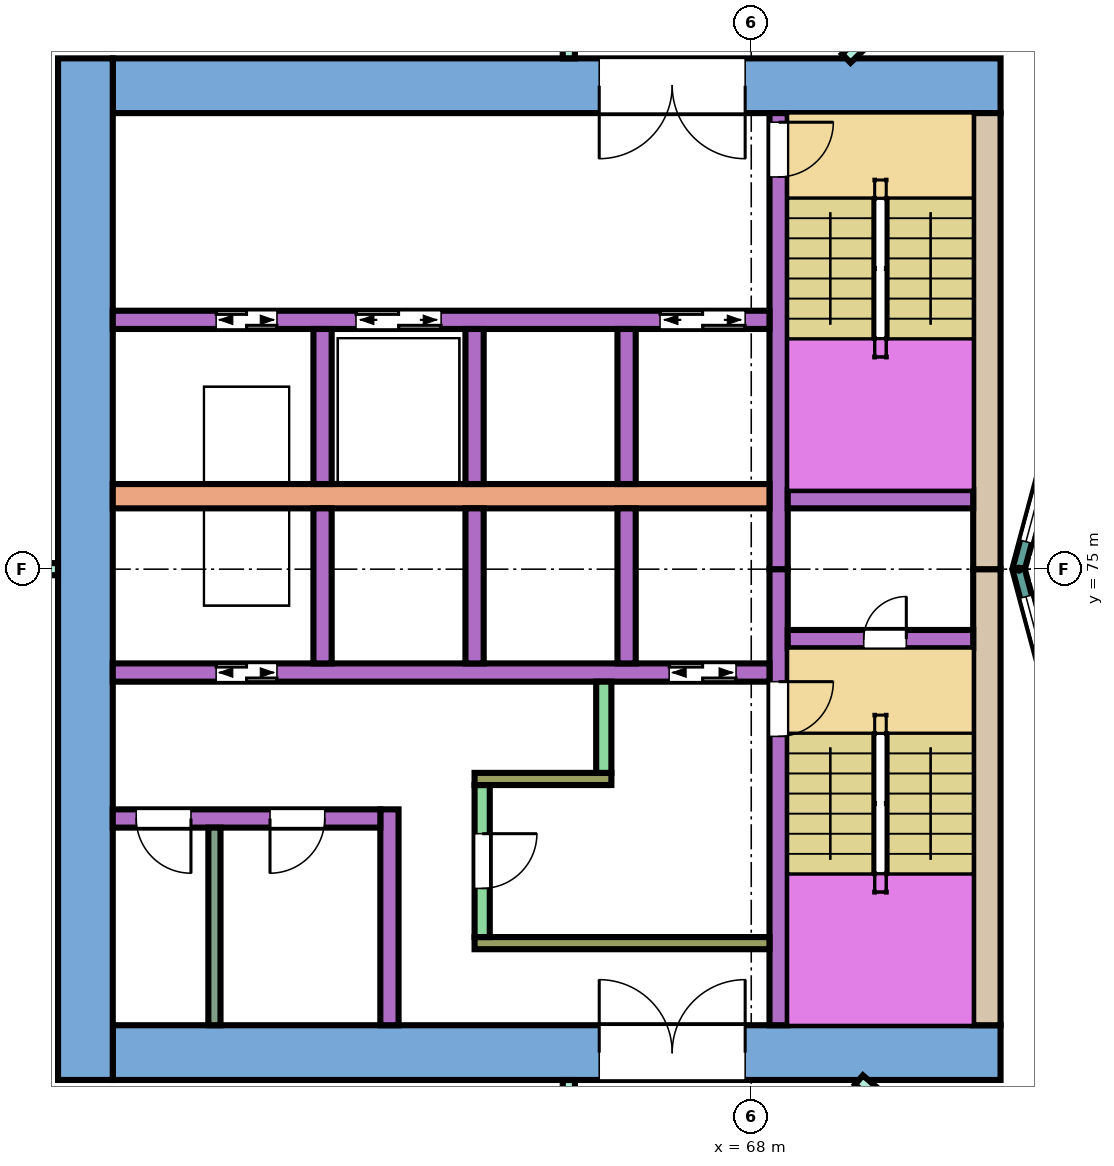
"""IFC4 building model, lengths in metres.
Left out: names, types, materials, properties, quantities, classifications, styles, units other than length and angle.
Written with IfcOpenShell. Run it as: python <this file> out.ifc"""

import sys

from ifc_helpers import new_model, si_unit, direction, frame, frame_2d, origin, place, context, subcontext, project, spatial, rectangle, extrude, element, fill, save


model = new_model("IFC4")
c1 = context("Model", 3, precision=1e-05, world=origin(), true_north=direction((0.0, 1.0)))
c2 = subcontext(c1, "Body", "Model", "MODEL_VIEW")
j1 = project(units=[si_unit("LENGTHUNIT", "METRE"), si_unit("PLANEANGLEUNIT", "RADIAN")], contexts=[c1])
p1 = place(None, origin())
s1 = spatial("IfcSite", under=j1, at=p1, CompositionType="ELEMENT")
p2 = place(p1, origin())
s2 = spatial("IfcBuilding", under=s1, at=p2, CompositionType="ELEMENT")
p3 = place(p2, frame((0.0, 0.0, 23.8)))
s3 = spatial("IfcBuildingStorey", under=s2, at=p3, CompositionType="ELEMENT", Elevation=23.8)
p4 = place(p3, frame((72.1, 67.05, 0.0), z_axis=(0.0, 0.0, 1.0), x_axis=(-1.0, 0.0, 0.0)))
e1 = element("IfcWall", 1, at=p4, inside=s3, PredefinedType="SHEAR", context=c2, shape_type="SweptSolid", body=[
    extrude(rectangle(XDim=14.6, YDim=0.9, at=frame_2d((7.3, 0.0))), origin(), (0.0, 0.0, 1.0), 4.68),
])
p5 = place(p4, frame((4.2, 0.0, 0.0)))
e2 = element("IfcOpeningElement", 2, at=p5, cuts=e1, PredefinedType="OPENING", context=c2, shape_type="SweptSolid", body=[
    extrude(rectangle(XDim=2.4, YDim=2.4, at=frame_2d((1.2, 1.2))), frame((0.0, 0.46, 0.0), z_axis=(0.0, -1.0, 0.0), x_axis=(1.0, 0.0, 0.0)), (0.0, 0.0, 1.0), 0.92),
])
p6 = place(p3, frame((72.1, 82.95, 0.0), z_axis=(0.0, 0.0, 1.0), x_axis=(-1.0, 0.0, 0.0)))
e3 = element("IfcWall", 3, at=p6, inside=s3, PredefinedType="SHEAR", context=c2, shape_type="SweptSolid", body=[
    extrude(rectangle(XDim=14.6, YDim=0.9, at=frame_2d((7.3, 0.0))), origin(), (0.0, 0.0, 1.0), 4.68),
])
p7 = place(p6, frame((4.2, 0.0, 0.0)))
e4 = element("IfcOpeningElement", 4, at=p7, cuts=e3, PredefinedType="OPENING", context=c2, shape_type="SweptSolid", body=[
    extrude(rectangle(XDim=2.4, YDim=2.4, at=frame_2d((1.2, 1.2))), frame((0.0, 0.46, 0.0), z_axis=(0.0, -1.0, 0.0), x_axis=(1.0, 0.0, 0.0)), (0.0, 0.0, 1.0), 0.92),
])
for number, where, z_axis, x_axis in (
    (5, (71.875, 75.0, 0.0), (0.0, 0.0, 1.0), (0.0, -1.0, 0.0)),
    (6, (71.875, 82.5, 0.0), (0.0, 0.0, 1.0), (0.0, -1.0, 0.0)),
):
    element("IfcWall", number, at=place(p3, frame(where, z_axis=z_axis, x_axis=x_axis)), inside=s3, PredefinedType="SHEAR", context=c2, shape_type="SweptSolid", body=[
        extrude(rectangle(XDim=7.5, YDim=0.45, at=frame_2d((3.75, 0.0))), origin(), (0.0, 0.0, 1.0), 4.68),
    ])
p8 = place(p3, frame((57.05, 83.4, 0.0), z_axis=(0.0, 0.0, 1.0), x_axis=(0.0, -1.0, 0.0)))
e7 = element("IfcWall", 7, at=p8, inside=s3, PredefinedType="SHEAR", context=c2, shape_type="SweptSolid", body=[
    extrude(rectangle(XDim=16.8, YDim=0.9, at=frame_2d((8.4, 0.0))), origin(), (0.0, 0.0, 1.0), 4.68),
])
p9 = place(p3, frame((68.45, 75.0, 0.0), z_axis=(0.0, 0.0, 1.0), x_axis=(0.0, -1.0, 0.0)))
e8 = element("IfcWall", 8, at=p9, inside=s3, PredefinedType="SHEAR", context=c2, shape_type="SweptSolid", body=[
    extrude(rectangle(XDim=7.5, YDim=0.3, at=frame_2d((3.75, 0.0))), origin(), (0.0, 0.0, 1.0), 4.68),
])
p10 = place(p9, frame((1.85, 0.0, 0.0)))
e9 = element("IfcOpeningElement", 9, at=p10, cuts=e8, PredefinedType="OPENING", context=c2, shape_type="SweptSolid", body=[
    extrude(rectangle(XDim=0.9, YDim=2.1, at=frame_2d((0.45, 1.05))), frame((0.0, 0.16, 0.0), z_axis=(0.0, -1.0, 0.0), x_axis=(1.0, 0.0, 0.0)), (0.0, 0.0, 1.0), 0.32),
])
p11 = place(p3, frame((68.45, 82.5, 0.0), z_axis=(0.0, 0.0, 1.0), x_axis=(0.0, -1.0, 0.0)))
e10 = element("IfcWall", 10, at=p11, inside=s3, PredefinedType="SHEAR", context=c2, shape_type="SweptSolid", body=[
    extrude(rectangle(XDim=7.5, YDim=0.3, at=frame_2d((3.75, 0.0))), origin(), (0.0, 0.0, 1.0), 4.68),
])
p12 = place(p11, frame((0.15, 0.0, 0.0)))
e11 = element("IfcOpeningElement", 11, at=p12, cuts=e10, PredefinedType="OPENING", context=c2, shape_type="SweptSolid", body=[
    extrude(rectangle(XDim=0.9, YDim=2.1, at=frame_2d((0.45, 1.05))), frame((0.0, 0.16, 0.0), z_axis=(0.0, -1.0, 0.0), x_axis=(1.0, 0.0, 0.0)), (0.0, 0.0, 1.0), 0.32),
])
p13 = place(p3, frame((71.65, 73.85, 0.0), z_axis=(0.0, 0.0, 1.0), x_axis=(-1.0, 0.0, 0.0)))
e12 = element("IfcWall", 12, at=p13, inside=s3, PredefinedType="SHEAR", context=c2, shape_type="SweptSolid", body=[
    extrude(rectangle(XDim=3.05, YDim=0.3, at=frame_2d((1.525, 0.0))), origin(), (0.0, 0.0, 1.0), 4.68),
])
p14 = place(p13, frame((1.1, 0.0, 0.0)))
e13 = element("IfcOpeningElement", 13, at=p14, cuts=e12, PredefinedType="OPENING", context=c2, shape_type="SweptSolid", body=[
    extrude(rectangle(XDim=0.7, YDim=2.0, at=frame_2d((0.35, 1.0))), frame((0.0, 0.16, 0.0), z_axis=(0.0, -1.0, 0.0), x_axis=(1.0, 0.0, 0.0)), (0.0, 0.0, 1.0), 0.32),
])
p15 = place(p3, frame((71.65, 76.15, 0.0), z_axis=(0.0, 0.0, 1.0), x_axis=(-1.0, 0.0, 0.0)))
e14 = element("IfcWall", 14, at=p15, inside=s3, PredefinedType="SHEAR", context=c2, shape_type="SweptSolid", body=[
    extrude(rectangle(XDim=3.05, YDim=0.3, at=frame_2d((1.525, 0.0))), origin(), (0.0, 0.0, 1.0), 4.68),
])
p16 = place(p3, frame((68.3, 73.3, 0.0), z_axis=(0.0, 0.0, 1.0), x_axis=(-1.0, 0.0, 0.0)))
e15 = element("IfcWall", 15, at=p16, inside=s3, PredefinedType="SHEAR", context=c2, shape_type="SweptSolid", body=[
    extrude(rectangle(XDim=10.8, YDim=0.3, at=frame_2d((5.4, 0.0))), origin(), (0.0, 0.0, 1.0), 4.68),
])
p17 = place(p16, frame((0.55, 0.0, 0.0)))
e16 = element("IfcOpeningElement", 16, at=p17, cuts=e15, PredefinedType="OPENING", context=c2, shape_type="SweptSolid", body=[
    extrude(rectangle(XDim=1.1, YDim=2.1, at=frame_2d((0.55, 1.05))), frame((0.0, 0.16, 0.0), z_axis=(0.0, -1.0, 0.0), x_axis=(1.0, 0.0, 0.0)), (0.0, 0.0, 1.0), 0.32),
])
p18 = place(p16, frame((8.1, 0.0, 0.0)))
e17 = element("IfcOpeningElement", 17, at=p18, cuts=e15, PredefinedType="OPENING", context=c2, shape_type="SweptSolid", body=[
    extrude(rectangle(XDim=1.0, YDim=2.1, at=frame_2d((0.5, 1.05))), frame((0.0, 0.16, 0.0), z_axis=(0.0, -1.0, 0.0), x_axis=(1.0, 0.0, 0.0)), (0.0, 0.0, 1.0), 0.32),
])
p19 = place(p3, frame((68.3, 76.2, 0.0), z_axis=(0.0, 0.0, 1.0), x_axis=(-1.0, 0.0, 0.0)))
e18 = element("IfcWall", 18, at=p19, inside=s3, PredefinedType="SHEAR", context=c2, shape_type="SweptSolid", body=[
    extrude(rectangle(XDim=10.8, YDim=0.4, at=frame_2d((5.4, 0.0))), origin(), (0.0, 0.0, 1.0), 4.68),
])
p20 = place(p3, frame((68.3, 79.1, 0.0), z_axis=(0.0, 0.0, 1.0), x_axis=(-1.0, 0.0, 0.0)))
e19 = element("IfcWall", 19, at=p20, inside=s3, PredefinedType="SHEAR", context=c2, shape_type="SweptSolid", body=[
    extrude(rectangle(XDim=10.8, YDim=0.3, at=frame_2d((5.4, 0.0))), origin(), (0.0, 0.0, 1.0), 4.68),
])
p21 = place(p20, frame((0.4, 0.0, 0.0)))
e20 = element("IfcOpeningElement", 20, at=p21, cuts=e19, PredefinedType="OPENING", context=c2, shape_type="SweptSolid", body=[
    extrude(rectangle(XDim=1.4, YDim=2.1, at=frame_2d((0.7, 1.05))), frame((0.0, 0.16, 0.0), z_axis=(0.0, -1.0, 0.0), x_axis=(1.0, 0.0, 0.0)), (0.0, 0.0, 1.0), 0.32),
])
p22 = place(p20, frame((5.4, 0.0, 0.0)))
e21 = element("IfcOpeningElement", 21, at=p22, cuts=e19, PredefinedType="OPENING", context=c2, shape_type="SweptSolid", body=[
    extrude(rectangle(XDim=1.4, YDim=2.1, at=frame_2d((0.7, 1.05))), frame((0.0, 0.16, 0.0), z_axis=(0.0, -1.0, 0.0), x_axis=(1.0, 0.0, 0.0)), (0.0, 0.0, 1.0), 0.32),
])
p23 = place(p20, frame((8.1, 0.0, 0.0)))
e22 = element("IfcOpeningElement", 22, at=p23, cuts=e19, PredefinedType="OPENING", context=c2, shape_type="SweptSolid", body=[
    extrude(rectangle(XDim=1.0, YDim=2.1, at=frame_2d((0.5, 1.05))), frame((0.0, 0.16, 0.0), z_axis=(0.0, -1.0, 0.0), x_axis=(1.0, 0.0, 0.0)), (0.0, 0.0, 1.0), 0.32),
])
for number, where, z_axis, x_axis in (
    (23, (65.95, 76.0, 0.0), (0.0, 0.0, 1.0), (0.0, -1.0, 0.0)),
    (24, (63.45, 76.0, 0.0), (0.0, 0.0, 1.0), (0.0, -1.0, 0.0)),
    (25, (60.95, 76.0, 0.0), (0.0, 0.0, 1.0), (0.0, -1.0, 0.0)),
    (26, (65.95, 78.95, 0.0), (0.0, 0.0, 1.0), (0.0, -1.0, 0.0)),
    (27, (63.45, 78.95, 0.0), (0.0, 0.0, 1.0), (0.0, -1.0, 0.0)),
    (28, (60.95, 78.95, 0.0), (0.0, 0.0, 1.0), (0.0, -1.0, 0.0)),
):
    element("IfcWall", number, at=place(p3, frame(where, z_axis=z_axis, x_axis=x_axis)), inside=s3, PredefinedType="SHEAR", context=c2, shape_type="SweptSolid", body=[
        extrude(rectangle(XDim=2.55, YDim=0.3, at=frame_2d((1.275, 0.0))), origin(), (0.0, 0.0, 1.0), 4.68),
    ])
p24 = place(p3, frame((68.3, 68.85, 0.0), z_axis=(0.0, 0.0, 1.0), x_axis=(-1.0, 0.0, 0.0)))
e29 = element("IfcWall", 29, at=p24, inside=s3, PredefinedType="SHEAR", context=c2, shape_type="SweptSolid", body=[
    extrude(rectangle(XDim=4.85, YDim=0.2, at=frame_2d((2.425, 0.0))), origin(), (0.0, 0.0, 1.0), 4.68),
])
p25 = place(p3, frame((63.575, 71.45, 0.0), z_axis=(0.0, 0.0, 1.0), x_axis=(0.0, -1.0, 0.0)))
e30 = element("IfcWall", 30, at=p25, inside=s3, PredefinedType="SHEAR", context=c2, shape_type="SweptSolid", body=[
    extrude(rectangle(XDim=2.5, YDim=0.25, at=frame_2d((1.25, 0.0))), origin(), (0.0, 0.0, 1.0), 4.68),
])
p26 = place(p25, frame((0.8, 0.0, 0.0)))
e31 = element("IfcOpeningElement", 31, at=p26, cuts=e30, PredefinedType="OPENING", context=c2, shape_type="SweptSolid", body=[
    extrude(rectangle(XDim=0.9, YDim=2.1, at=frame_2d((0.45, 1.05))), frame((0.0, 0.135, 0.0), z_axis=(0.0, -1.0, 0.0), x_axis=(1.0, 0.0, 0.0)), (0.0, 0.0, 1.0), 0.27),
])
p27 = place(p3, frame((65.7, 71.55, 0.0), z_axis=(0.0, 0.0, 1.0), x_axis=(-1.0, 0.0, 0.0)))
e32 = element("IfcWall", 32, at=p27, inside=s3, PredefinedType="SHEAR", context=c2, shape_type="SweptSolid", body=[
    extrude(rectangle(XDim=2.25, YDim=0.2, at=frame_2d((1.125, 0.0))), origin(), (0.0, 0.0, 1.0), 4.68),
])
p28 = place(p3, frame((65.575, 73.15, 0.0), z_axis=(0.0, 0.0, 1.0), x_axis=(0.0, -1.0, 0.0)))
e33 = element("IfcWall", 33, at=p28, inside=s3, PredefinedType="SHEAR", context=c2, shape_type="SweptSolid", body=[
    extrude(rectangle(XDim=1.5, YDim=0.25, at=frame_2d((0.75, 0.0))), origin(), (0.0, 0.0, 1.0), 4.68),
])
p29 = place(p3, frame((62.05, 71.05, 0.0), z_axis=(0.0, 0.0, 1.0), x_axis=(0.0, -1.0, 0.0)))
e34 = element("IfcWall", 34, at=p29, inside=s3, PredefinedType="SHEAR", context=c2, shape_type="SweptSolid", body=[
    extrude(rectangle(XDim=3.55, YDim=0.3, at=frame_2d((1.775, 0.0))), origin(), (0.0, 0.0, 1.0), 4.68),
])
p30 = place(p3, frame((61.9, 70.9, 0.0), z_axis=(0.0, 0.0, 1.0), x_axis=(-1.0, 0.0, 0.0)))
e35 = element("IfcWall", 35, at=p30, inside=s3, PredefinedType="SHEAR", context=c2, shape_type="SweptSolid", body=[
    extrude(rectangle(XDim=4.4, YDim=0.3, at=frame_2d((2.2, 0.0))), origin(), (0.0, 0.0, 1.0), 4.68),
])
p31 = place(p30, frame((0.914, 0.0, 0.0)))
e36 = element("IfcOpeningElement", 36, at=p31, cuts=e35, PredefinedType="OPENING", context=c2, shape_type="SweptSolid", body=[
    extrude(rectangle(XDim=0.9, YDim=2.1, at=frame_2d((0.45, 1.05))), frame((0.0, 0.16, 0.0), z_axis=(0.0, -1.0, 0.0), x_axis=(1.0, 0.0, 0.0)), (0.0, 0.0, 1.0), 0.32),
])
p32 = place(p30, frame((3.114, 0.0, 0.0)))
e37 = element("IfcOpeningElement", 37, at=p32, cuts=e35, PredefinedType="OPENING", context=c2, shape_type="SweptSolid", body=[
    extrude(rectangle(XDim=0.9, YDim=2.1, at=frame_2d((0.45, 1.05))), frame((0.0, 0.16, 0.0), z_axis=(0.0, -1.0, 0.0), x_axis=(1.0, 0.0, 0.0)), (0.0, 0.0, 1.0), 0.32),
])
p33 = place(p3, frame((73.415, 78.802, 0.0), z_axis=(0.0, 0.0, 1.0), x_axis=(-0.258789828301, -0.965933654434, 0.0)))
e38 = element("IfcWall", 38, at=p33, inside=s3, PredefinedType="NOTDEFINED", context=c2, shape_type="SweptSolid", body=[
    extrude(rectangle(XDim=3.936, YDim=0.2, at=frame_2d((1.968, 0.0))), origin(), (0.0, 0.0, 1.0), 5.0),
])
p34 = place(p33, frame((0.468, 0.0, 0.9)))
e39 = element("IfcOpeningElement", 39, at=p34, cuts=e38, PredefinedType="OPENING", context=c2, shape_type="SweptSolid", body=[
    extrude(rectangle(XDim=3.0, YDim=2.3, at=frame_2d((1.5, 1.15))), frame((0.0, 0.11, 0.0), z_axis=(0.0, -1.0, 0.0), x_axis=(1.0, 0.0, 0.0)), (0.0, 0.0, 1.0), 0.22),
])
p35 = place(p3, frame((72.396, 75.0, 0.0), z_axis=(0.0, 0.0, 1.0), x_axis=(0.258789828301, -0.965933654434, 0.0)))
e40 = element("IfcWall", 40, at=p35, inside=s3, PredefinedType="NOTDEFINED", context=c2, shape_type="SweptSolid", body=[
    extrude(rectangle(XDim=3.936, YDim=0.2, at=frame_2d((1.968, 0.0))), origin(), (0.0, 0.0, 1.0), 5.0),
])
p36 = place(p35, frame((0.468, 0.0, 0.9)))
e41 = element("IfcOpeningElement", 41, at=p36, cuts=e40, PredefinedType="OPENING", context=c2, shape_type="SweptSolid", body=[
    extrude(rectangle(XDim=3.0, YDim=2.3, at=frame_2d((1.5, 1.15))), frame((0.0, 0.11, 0.0), z_axis=(0.0, -1.0, 0.0), x_axis=(1.0, 0.0, 0.0)), (0.0, 0.0, 1.0), 0.22),
])
p37 = place(p3, frame((50.703, 75.0, 0.0), z_axis=(0.0, 0.0, 1.0), x_axis=(1.0, 0.0, 0.0)))
e42 = element("IfcWall", 42, at=p37, inside=s3, PredefinedType="PARTITIONING", context=c2, shape_type="SweptSolid", body=[
    extrude(rectangle(XDim=5.896, YDim=0.2, at=frame_2d((2.948, 0.0))), origin(), (0.0, 0.0, 1.0), 4.55),
])
for number, where, z_axis, x_axis in (
    (43, (65.0, 65.2, 0.0), (0.0, 0.0, 1.0), (0.0, 1.0, 0.0)),
    (44, (65.0, 83.401, 0.0), (0.0, 0.0, 1.0), (0.0, 1.0, 0.0)),
):
    element("IfcWall", number, at=place(p3, frame(where, z_axis=z_axis, x_axis=x_axis)), inside=s3, PredefinedType="PARTITIONING", context=c2, shape_type="SweptSolid", body=[
        extrude(rectangle(XDim=1.399, YDim=0.2, at=frame_2d((0.7, 0.0))), origin(), (0.0, 0.0, 1.0), 4.55),
    ])
p38 = place(p3, frame((69.563, 83.4, 0.0), z_axis=(0.0, 0.0, 1.0), x_axis=(0.719454254864, 0.694539829785, 0.0)))
e45 = element("IfcWall", 45, at=p38, inside=s3, PredefinedType="PARTITIONING", context=c2, shape_type="SweptSolid", body=[
    extrude(rectangle(XDim=4.86, YDim=0.2, at=frame_2d((2.43, 0.0))), origin(), (0.0, 0.0, 1.0), 4.55),
])
p39 = place(p38, frame((2.035, 0.0, 0.0)))
e46 = element("IfcOpeningElement", 46, at=p39, cuts=e45, PredefinedType="OPENING", context=c2, shape_type="SweptSolid", body=[
    extrude(rectangle(XDim=0.9, YDim=2.1, at=frame_2d((0.45, 1.05))), frame((0.0, 0.11, 0.0), z_axis=(0.0, -1.0, 0.0), x_axis=(1.0, 0.0, 0.0)), (0.0, 0.0, 1.0), 0.22),
])
p40 = place(p3, frame((69.771, 66.6, 0.0), z_axis=(0.0, 0.0, 1.0), x_axis=(0.758040611529, -0.652207352974, 0.0)))
e47 = element("IfcWall", 47, at=p40, inside=s3, PredefinedType="PARTITIONING", context=c2, shape_type="SweptSolid", body=[
    extrude(rectangle(XDim=4.625, YDim=0.2, at=frame_2d((2.312, 0.0))), origin(), (0.0, 0.0, 1.0), 4.55),
])
p41 = place(p40, frame((1.887, 0.0, 0.0)))
e48 = element("IfcOpeningElement", 48, at=p41, cuts=e47, PredefinedType="OPENING", context=c2, shape_type="SweptSolid", body=[
    extrude(rectangle(XDim=0.9, YDim=2.1, at=frame_2d((0.45, 1.05))), frame((0.0, 0.11, 0.0), z_axis=(0.0, -1.0, 0.0), x_axis=(1.0, 0.0, 0.0)), (0.0, 0.0, 1.0), 0.22),
])
p42 = place(p3, frame((59.172, 70.75, 0.0), z_axis=(0.0, 0.0, 1.0), x_axis=(0.0, -1.0, 0.0)))
e49 = element("IfcWall", 49, at=p42, inside=s3, PredefinedType="PARTITIONING", context=c2, shape_type="SweptSolid", body=[
    extrude(rectangle(XDim=3.25, YDim=0.2, at=frame_2d((1.625, 0.0))), origin(), (0.0, 0.0, 1.0), 4.68),
])
p43 = place(p34, origin())
e50 = element("IfcWindow", 50, at=p43, inside=s3, PartitioningType="SINGLE_PANEL", PredefinedType="WINDOW", context=c2, shape_type="SweptSolid", body=[
    extrude(rectangle(XDim=3.0, YDim=2.3, at=frame_2d((1.5, 1.15))), frame((0.0, 0.03, 0.0), z_axis=(0.0, -1.0, 0.0), x_axis=(1.0, 0.0, 0.0)), (0.0, 0.0, 1.0), 0.06),
])
fill(e39, e50)
p44 = place(p36, origin())
e51 = element("IfcWindow", 51, at=p44, inside=s3, PartitioningType="SINGLE_PANEL", PredefinedType="WINDOW", context=c2, shape_type="SweptSolid", body=[
    extrude(rectangle(XDim=3.0, YDim=2.3, at=frame_2d((1.5, 1.15))), frame((0.0, 0.03, 0.0), z_axis=(0.0, -1.0, 0.0), x_axis=(1.0, 0.0, 0.0)), (0.0, 0.0, 1.0), 0.06),
])
fill(e41, e51)
p45 = place(p14, frame((0.7, 0.0, 0.0), z_axis=(0.0, 0.0, 1.0), x_axis=(-1.0, 0.0, 0.0)))
e52 = element("IfcDoor", 52, at=p45, inside=s3, OperationType="SINGLE_SWING_RIGHT", PredefinedType="DOOR", context=c2, shape_type="SweptSolid", body=[
    extrude(rectangle(XDim=0.7, YDim=2.0, at=frame_2d((0.35, 1.0))), frame((0.0, 0.025, 0.0), z_axis=(0.0, -1.0, 0.0), x_axis=(1.0, 0.0, 0.0)), (0.0, 0.0, 1.0), 0.05),
])
fill(e13, e52)
p46 = place(p10, origin())
e53 = element("IfcDoor", 53, at=p46, inside=s3, OperationType="SINGLE_SWING_LEFT", PredefinedType="DOOR", context=c2, shape_type="SweptSolid", body=[
    extrude(rectangle(XDim=0.9, YDim=2.1, at=frame_2d((0.45, 1.05))), frame((0.0, 0.025, 0.0), z_axis=(0.0, -1.0, 0.0), x_axis=(1.0, 0.0, 0.0)), (0.0, 0.0, 1.0), 0.05),
])
fill(e9, e53)
p47 = place(p12, origin())
e54 = element("IfcDoor", 54, at=p47, inside=s3, OperationType="SINGLE_SWING_LEFT", PredefinedType="DOOR", context=c2, shape_type="SweptSolid", body=[
    extrude(rectangle(XDim=0.9, YDim=2.1, at=frame_2d((0.45, 1.05))), frame((0.0, 0.025, 0.0), z_axis=(0.0, -1.0, 0.0), x_axis=(1.0, 0.0, 0.0)), (0.0, 0.0, 1.0), 0.05),
])
fill(e11, e54)
p48 = place(p17, origin())
e55 = element("IfcDoor", 55, at=p48, inside=s3, OperationType="DOUBLE_DOOR_SLIDING", PredefinedType="DOOR", context=c2, shape_type="SweptSolid", body=[
    extrude(rectangle(XDim=1.1, YDim=2.1, at=frame_2d((0.55, 1.05))), frame((0.0, 0.025, 0.0), z_axis=(0.0, -1.0, 0.0), x_axis=(1.0, 0.0, 0.0)), (0.0, 0.0, 1.0), 0.05),
])
fill(e16, e55)
p49 = place(p18, origin())
e56 = element("IfcDoor", 56, at=p49, inside=s3, OperationType="DOUBLE_DOOR_SLIDING", PredefinedType="DOOR", context=c2, shape_type="SweptSolid", body=[
    extrude(rectangle(XDim=1.0, YDim=2.1, at=frame_2d((0.5, 1.05))), frame((0.0, 0.025, 0.0), z_axis=(0.0, -1.0, 0.0), x_axis=(1.0, 0.0, 0.0)), (0.0, 0.0, 1.0), 0.05),
])
fill(e17, e56)
p50 = place(p21, origin())
e57 = element("IfcDoor", 57, at=p50, inside=s3, OperationType="DOUBLE_DOOR_SLIDING", PredefinedType="DOOR", context=c2, shape_type="SweptSolid", body=[
    extrude(rectangle(XDim=1.4, YDim=2.1, at=frame_2d((0.7, 1.05))), frame((0.0, 0.025, 0.0), z_axis=(0.0, -1.0, 0.0), x_axis=(1.0, 0.0, 0.0)), (0.0, 0.0, 1.0), 0.05),
])
fill(e20, e57)
p51 = place(p22, origin())
e58 = element("IfcDoor", 58, at=p51, inside=s3, OperationType="DOUBLE_DOOR_SLIDING", PredefinedType="DOOR", context=c2, shape_type="SweptSolid", body=[
    extrude(rectangle(XDim=1.4, YDim=2.1, at=frame_2d((0.7, 1.05))), frame((0.0, 0.025, 0.0), z_axis=(0.0, -1.0, 0.0), x_axis=(1.0, 0.0, 0.0)), (0.0, 0.0, 1.0), 0.05),
])
fill(e21, e58)
p52 = place(p23, origin())
e59 = element("IfcDoor", 59, at=p52, inside=s3, OperationType="DOUBLE_DOOR_SLIDING", PredefinedType="DOOR", context=c2, shape_type="SweptSolid", body=[
    extrude(rectangle(XDim=1.0, YDim=2.1, at=frame_2d((0.5, 1.05))), frame((0.0, 0.025, 0.0), z_axis=(0.0, -1.0, 0.0), x_axis=(1.0, 0.0, 0.0)), (0.0, 0.0, 1.0), 0.05),
])
fill(e22, e59)
p53 = place(p26, origin())
e60 = element("IfcDoor", 60, at=p53, inside=s3, OperationType="SINGLE_SWING_LEFT", PredefinedType="DOOR", context=c2, shape_type="SweptSolid", body=[
    extrude(rectangle(XDim=0.9, YDim=2.1, at=frame_2d((0.45, 1.05))), frame((0.0, 0.025, 0.0), z_axis=(0.0, -1.0, 0.0), x_axis=(1.0, 0.0, 0.0)), (0.0, 0.0, 1.0), 0.05),
])
fill(e31, e60)
p54 = place(p31, origin())
e61 = element("IfcDoor", 61, at=p54, inside=s3, OperationType="SINGLE_SWING_RIGHT", PredefinedType="DOOR", context=c2, shape_type="SweptSolid", body=[
    extrude(rectangle(XDim=0.9, YDim=2.1, at=frame_2d((0.45, 1.05))), frame((0.0, 0.025, 0.0), z_axis=(0.0, -1.0, 0.0), x_axis=(1.0, 0.0, 0.0)), (0.0, 0.0, 1.0), 0.05),
])
fill(e36, e61)
p55 = place(p32, origin())
e62 = element("IfcDoor", 62, at=p55, inside=s3, OperationType="SINGLE_SWING_LEFT", PredefinedType="DOOR", context=c2, shape_type="SweptSolid", body=[
    extrude(rectangle(XDim=0.9, YDim=2.1, at=frame_2d((0.45, 1.05))), frame((0.0, 0.025, 0.0), z_axis=(0.0, -1.0, 0.0), x_axis=(1.0, 0.0, 0.0)), (0.0, 0.0, 1.0), 0.05),
])
fill(e37, e62)
p56 = place(p5, frame((2.4, 0.0, 0.0), z_axis=(0.0, 0.0, 1.0), x_axis=(-1.0, 0.0, 0.0)))
e63 = element("IfcDoor", 63, at=p56, inside=s3, OperationType="DOUBLE_DOOR_SINGLE_SWING", PredefinedType="DOOR", context=c2, shape_type="SweptSolid", body=[
    extrude(rectangle(XDim=2.4, YDim=2.4, at=frame_2d((1.2, 1.2))), frame((0.0, 0.025, 0.0), z_axis=(0.0, -1.0, 0.0), x_axis=(1.0, 0.0, 0.0)), (0.0, 0.0, 1.0), 0.05),
])
fill(e2, e63)
p57 = place(p7, origin())
e64 = element("IfcDoor", 64, at=p57, inside=s3, OperationType="DOUBLE_DOOR_SINGLE_SWING", PredefinedType="DOOR", context=c2, shape_type="SweptSolid", body=[
    extrude(rectangle(XDim=2.4, YDim=2.4, at=frame_2d((1.2, 1.2))), frame((0.0, 0.025, 0.0), z_axis=(0.0, -1.0, 0.0), x_axis=(1.0, 0.0, 0.0)), (0.0, 0.0, 1.0), 0.05),
])
fill(e4, e64)
save(model, sys.argv[1])
